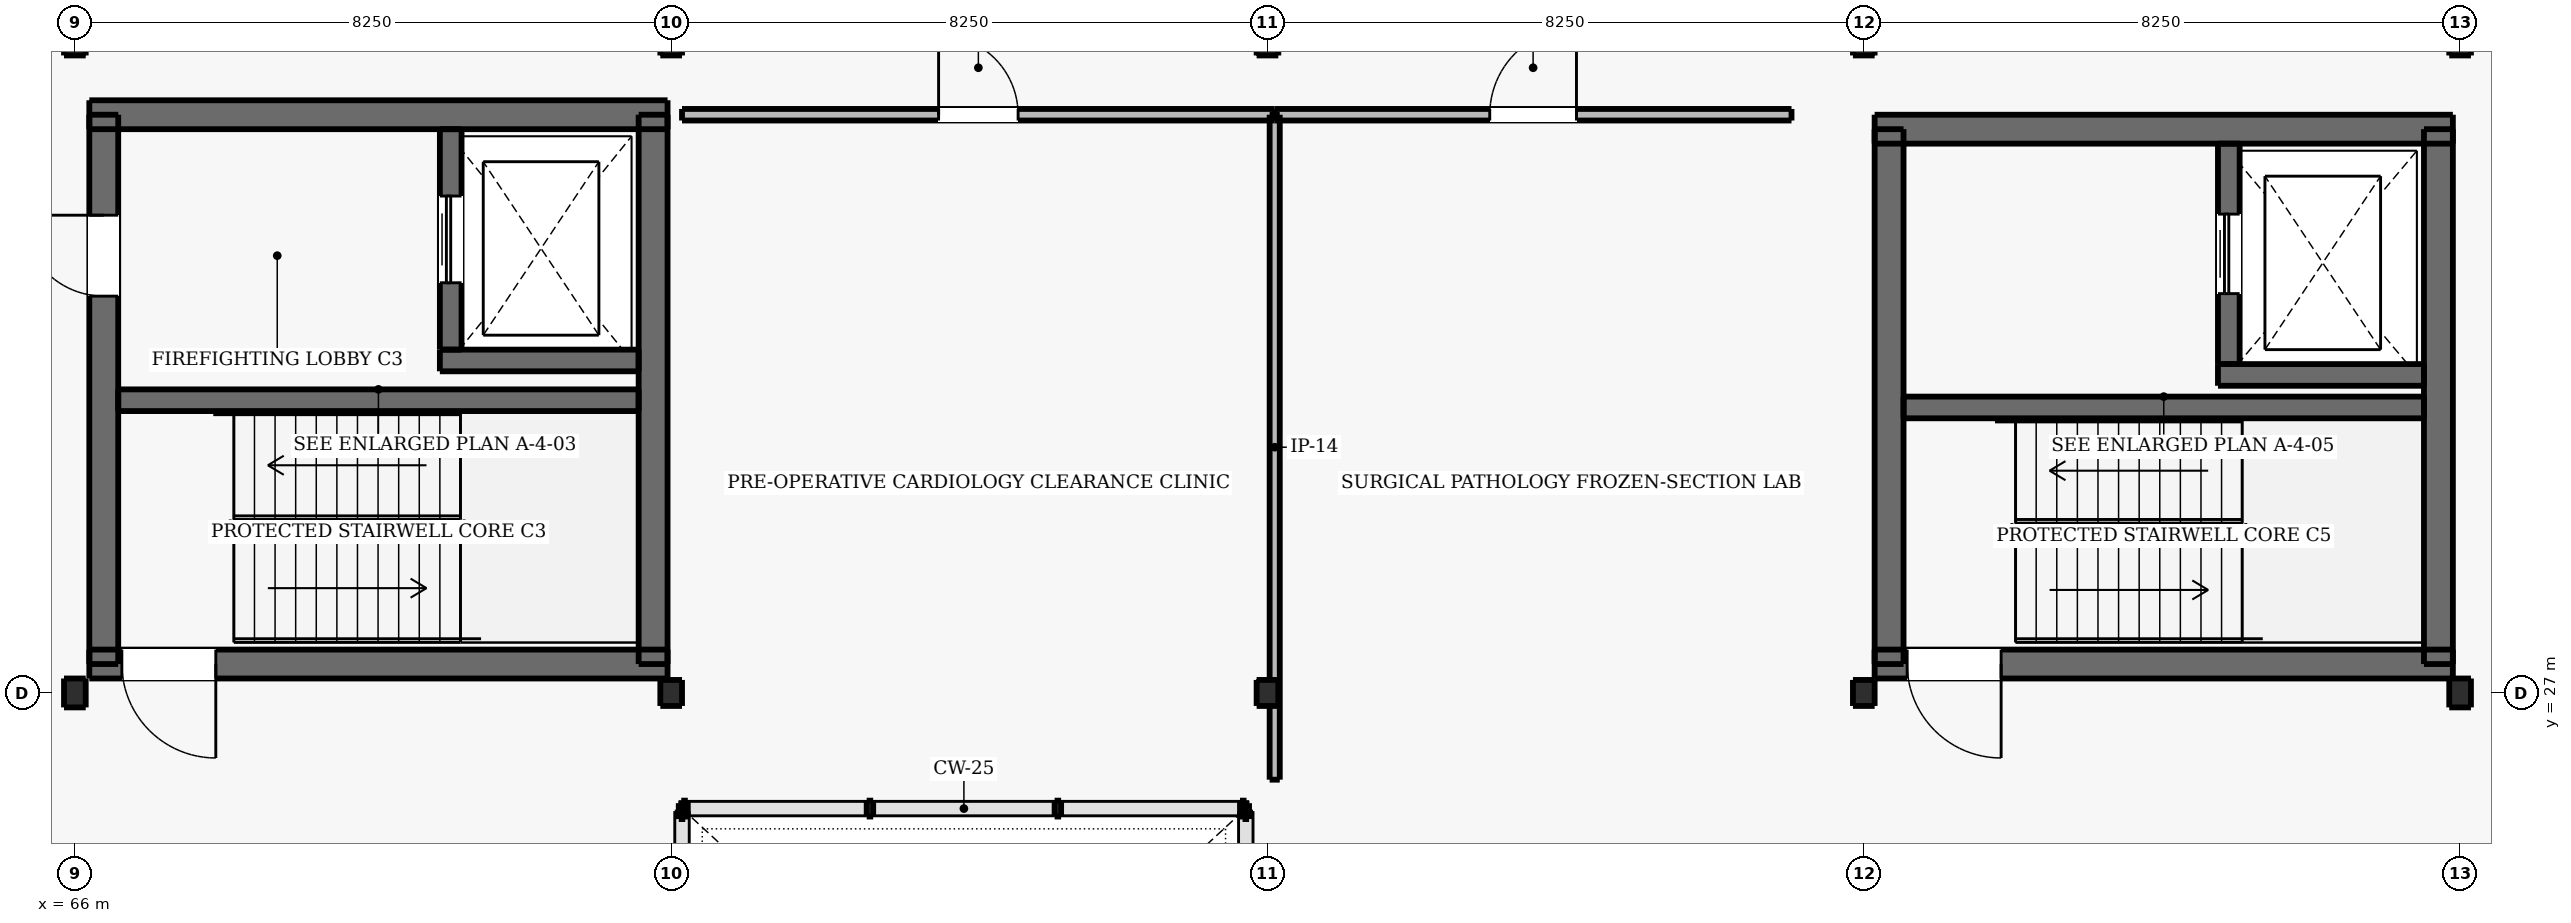
"""IFC4 building model, lengths in metres.
Left out: names, types, materials, properties, quantities, classifications, styles, units other than length and angle.
Written with IfcOpenShell. Run it as: python <this file> out.ifc"""

import sys

from ifc_helpers import new_model, si_unit, direction, frame, frame_2d, origin, origin_2d, place, context, subcontext, project, spatial, rectangle, i_section, extrude, element, fill, save


model = new_model("IFC4")
c1 = context("Model", 3, precision=1e-05, world=origin(), true_north=direction((0.0, 1.0)))
c2 = subcontext(c1, "Body", "Model", "MODEL_VIEW")
j1 = project(units=[si_unit("LENGTHUNIT", "METRE"), si_unit("PLANEANGLEUNIT", "RADIAN")], contexts=[c1])
p1 = place(None, origin())
s1 = spatial("IfcSite", under=j1, at=p1, CompositionType="ELEMENT")
p2 = place(p1, origin())
s2 = spatial("IfcBuilding", under=s1, at=p2, CompositionType="ELEMENT")
p3 = place(p2, frame((0.0, 0.0, 13.8)))
s3 = spatial("IfcBuildingStorey", under=s2, at=p3, CompositionType="ELEMENT", Elevation=13.8)
p4 = place(p3, frame((66.0, 27.0, 0.0), z_axis=(0.0, 0.0, 1.0), x_axis=(1.0, 0.0, 0.0)))
e1 = element("IfcColumn", 1, at=p4, inside=s3, PredefinedType="COLUMN", context=c2, shape_type="SweptSolid", body=[
    extrude(i_section(OverallWidth=0.3, OverallDepth=0.4, WebThickness=0.013, FlangeThickness=0.024, FilletRadius=0.027, at=origin_2d()), origin(), (0.0, 0.0, 1.0), 4.2),
])
for number, where, z_axis, x_axis in (
    (2, (66.0, 36.0, 0.0), (0.0, 0.0, 1.0), (1.0, 0.0, 0.0)),
    (3, (74.25, 27.0, 0.0), (0.0, 0.0, 1.0), (1.0, 0.0, 0.0)),
    (4, (74.25, 36.0, 0.0), (0.0, 0.0, 1.0), (1.0, 0.0, 0.0)),
    (5, (82.5, 27.0, 0.0), (0.0, 0.0, 1.0), (1.0, 0.0, 0.0)),
    (6, (82.5, 36.0, 0.0), (0.0, 0.0, 1.0), (1.0, 0.0, 0.0)),
    (7, (90.75, 27.0, 0.0), (0.0, 0.0, 1.0), (1.0, 0.0, 0.0)),
    (8, (90.75, 36.0, 0.0), (0.0, 0.0, 1.0), (1.0, 0.0, 0.0)),
):
    element("IfcColumn", number, at=place(p3, frame(where, z_axis=z_axis, x_axis=x_axis)), inside=s3, PredefinedType="COLUMN", context=c2, shape_type="SweptSolid", body=[
        extrude(i_section(OverallWidth=0.3, OverallDepth=0.36, WebThickness=0.012, FlangeThickness=0.022, FilletRadius=0.027, at=origin_2d()), origin(), (0.0, 0.0, 1.0), 4.2),
    ])
p5 = place(p3, frame((99.0, 27.0, 0.0), z_axis=(0.0, 0.0, 1.0), x_axis=(1.0, 0.0, 0.0)))
e9 = element("IfcColumn", 9, at=p5, inside=s3, PredefinedType="COLUMN", context=c2, shape_type="SweptSolid", body=[
    extrude(i_section(OverallWidth=0.3, OverallDepth=0.4, WebThickness=0.013, FlangeThickness=0.024, FilletRadius=0.027, at=origin_2d()), origin(), (0.0, 0.0, 1.0), 4.2),
])
p6 = place(p3, frame((99.0, 36.0, 0.0), z_axis=(0.0, 0.0, 1.0), x_axis=(1.0, 0.0, 0.0)))
e10 = element("IfcColumn", 10, at=p6, inside=s3, PredefinedType="COLUMN", context=c2, shape_type="SweptSolid", body=[
    extrude(i_section(OverallWidth=0.3, OverallDepth=0.36, WebThickness=0.012, FlangeThickness=0.022, FilletRadius=0.027, at=origin_2d()), origin(), (0.0, 0.0, 1.0), 4.2),
])
p7 = place(p3, frame((66.2, 27.4, 0.0), z_axis=(0.0, 0.0, 1.0), x_axis=(1.0, 0.0, 0.0)))
e11 = element("IfcWall", 11, at=p7, inside=s3, PredefinedType="SHEAR", context=c2, shape_type="SweptSolid", body=[
    extrude(rectangle(XDim=8.0, YDim=0.4, at=frame_2d((4.0, 0.0))), origin(), (0.0, 0.0, 1.0), 4.2),
])
p8 = place(p7, frame((0.45, 0.0, 0.0)))
e12 = element("IfcOpeningElement", 12, at=p8, cuts=e11, PredefinedType="OPENING", context=c2, shape_type="SweptSolid", body=[
    extrude(rectangle(XDim=1.3, YDim=2.15, at=frame_2d((0.65, 1.075))), frame((0.0, 0.21, 0.0), z_axis=(0.0, -1.0, 0.0), x_axis=(1.0, 0.0, 0.0)), (0.0, 0.0, 1.0), 0.42),
])
p9 = place(p3, frame((66.2, 35.0, 0.0), z_axis=(0.0, 0.0, 1.0), x_axis=(1.0, 0.0, 0.0)))
e13 = element("IfcWall", 13, at=p9, inside=s3, PredefinedType="SHEAR", context=c2, shape_type="SweptSolid", body=[
    extrude(rectangle(XDim=8.0, YDim=0.4, at=frame_2d((4.0, 0.0))), origin(), (0.0, 0.0, 1.0), 4.2),
])
p10 = place(p3, frame((66.4, 27.4, 0.0), z_axis=(0.0, 0.0, 1.0), x_axis=(0.0, 1.0, 0.0)))
e14 = element("IfcWall", 14, at=p10, inside=s3, PredefinedType="SHEAR", context=c2, shape_type="SweptSolid", body=[
    extrude(rectangle(XDim=7.6, YDim=0.4, at=frame_2d((3.8, 0.0))), origin(), (0.0, 0.0, 1.0), 4.2),
])
p11 = place(p10, frame((5.09, 0.0, 0.0)))
e15 = element("IfcOpeningElement", 15, at=p11, cuts=e14, PredefinedType="OPENING", context=c2, shape_type="SweptSolid", body=[
    extrude(rectangle(XDim=1.12, YDim=2.15, at=frame_2d((0.56, 1.075))), frame((0.0, 0.21, 0.0), z_axis=(0.0, -1.0, 0.0), x_axis=(1.0, 0.0, 0.0)), (0.0, 0.0, 1.0), 0.42),
])
p12 = place(p3, frame((74.0, 27.4, 0.0), z_axis=(0.0, 0.0, 1.0), x_axis=(0.0, 1.0, 0.0)))
e16 = element("IfcWall", 16, at=p12, inside=s3, PredefinedType="SHEAR", context=c2, shape_type="SweptSolid", body=[
    extrude(rectangle(XDim=7.6, YDim=0.4, at=frame_2d((3.8, 0.0))), origin(), (0.0, 0.0, 1.0), 4.2),
])
p13 = place(p3, frame((66.6, 31.05, 0.0), z_axis=(0.0, 0.0, 1.0), x_axis=(1.0, 0.0, 0.0)))
e17 = element("IfcWall", 17, at=p13, inside=s3, PredefinedType="SHEAR", context=c2, shape_type="SweptSolid", body=[
    extrude(rectangle(XDim=7.2, YDim=0.3, at=frame_2d((3.6, 0.0))), origin(), (0.0, 0.0, 1.0), 4.2),
])
p14 = place(p3, frame((71.05, 31.6, 0.0), z_axis=(0.0, 0.0, 1.0), x_axis=(1.0, 0.0, 0.0)))
e18 = element("IfcWall", 18, at=p14, inside=s3, PredefinedType="SHEAR", context=c2, shape_type="SweptSolid", body=[
    extrude(rectangle(XDim=2.75, YDim=0.3, at=frame_2d((1.375, 0.0))), origin(), (0.0, 0.0, 1.0), 4.2),
])
p15 = place(p3, frame((71.2, 31.75, 0.0), z_axis=(0.0, 0.0, 1.0), x_axis=(0.0, 1.0, 0.0)))
e19 = element("IfcWall", 19, at=p15, inside=s3, PredefinedType="SHEAR", context=c2, shape_type="SweptSolid", body=[
    extrude(rectangle(XDim=3.05, YDim=0.3, at=frame_2d((1.525, 0.0))), origin(), (0.0, 0.0, 1.0), 4.2),
])
p16 = place(p15, frame((0.925, 0.0, 0.0)))
e20 = element("IfcOpeningElement", 20, at=p16, cuts=e19, PredefinedType="OPENING", context=c2, shape_type="SweptSolid", body=[
    extrude(rectangle(XDim=1.2, YDim=2.15, at=frame_2d((0.6, 1.075))), frame((0.0, 0.16, 0.0), z_axis=(0.0, -1.0, 0.0), x_axis=(1.0, 0.0, 0.0)), (0.0, 0.0, 1.0), 0.32),
])
p17 = place(p3, frame((90.9, 27.4, 0.0), z_axis=(0.0, 0.0, 1.0), x_axis=(1.0, 0.0, 0.0)))
e21 = element("IfcWall", 21, at=p17, inside=s3, PredefinedType="SHEAR", context=c2, shape_type="SweptSolid", body=[
    extrude(rectangle(XDim=8.0, YDim=0.4, at=frame_2d((4.0, 0.0))), origin(), (0.0, 0.0, 1.0), 4.2),
])
p18 = place(p17, frame((0.45, 0.0, 0.0)))
e22 = element("IfcOpeningElement", 22, at=p18, cuts=e21, PredefinedType="OPENING", context=c2, shape_type="SweptSolid", body=[
    extrude(rectangle(XDim=1.3, YDim=2.15, at=frame_2d((0.65, 1.075))), frame((0.0, 0.21, 0.0), z_axis=(0.0, -1.0, 0.0), x_axis=(1.0, 0.0, 0.0)), (0.0, 0.0, 1.0), 0.42),
])
p19 = place(p3, frame((90.9, 34.8, 0.0), z_axis=(0.0, 0.0, 1.0), x_axis=(1.0, 0.0, 0.0)))
e23 = element("IfcWall", 23, at=p19, inside=s3, PredefinedType="SHEAR", context=c2, shape_type="SweptSolid", body=[
    extrude(rectangle(XDim=8.0, YDim=0.4, at=frame_2d((4.0, 0.0))), origin(), (0.0, 0.0, 1.0), 4.2),
])
for number, where, z_axis, x_axis in (
    (24, (91.1, 27.4, 0.0), (0.0, 0.0, 1.0), (0.0, 1.0, 0.0)),
    (25, (98.7, 27.4, 0.0), (0.0, 0.0, 1.0), (0.0, 1.0, 0.0)),
):
    element("IfcWall", number, at=place(p3, frame(where, z_axis=z_axis, x_axis=x_axis)), inside=s3, PredefinedType="SHEAR", context=c2, shape_type="SweptSolid", body=[
        extrude(rectangle(XDim=7.4, YDim=0.4, at=frame_2d((3.7, 0.0))), origin(), (0.0, 0.0, 1.0), 4.2),
    ])
p20 = place(p3, frame((91.3, 30.95, 0.0), z_axis=(0.0, 0.0, 1.0), x_axis=(1.0, 0.0, 0.0)))
e26 = element("IfcWall", 26, at=p20, inside=s3, PredefinedType="SHEAR", context=c2, shape_type="SweptSolid", body=[
    extrude(rectangle(XDim=7.2, YDim=0.3, at=frame_2d((3.6, 0.0))), origin(), (0.0, 0.0, 1.0), 4.2),
])
p21 = place(p3, frame((95.65, 31.4, 0.0), z_axis=(0.0, 0.0, 1.0), x_axis=(1.0, 0.0, 0.0)))
e27 = element("IfcWall", 27, at=p21, inside=s3, PredefinedType="SHEAR", context=c2, shape_type="SweptSolid", body=[
    extrude(rectangle(XDim=2.85, YDim=0.3, at=frame_2d((1.425, 0.0))), origin(), (0.0, 0.0, 1.0), 4.2),
])
p22 = place(p3, frame((95.8, 31.55, 0.0), z_axis=(0.0, 0.0, 1.0), x_axis=(0.0, 1.0, 0.0)))
e28 = element("IfcWall", 28, at=p22, inside=s3, PredefinedType="SHEAR", context=c2, shape_type="SweptSolid", body=[
    extrude(rectangle(XDim=3.05, YDim=0.3, at=frame_2d((1.525, 0.0))), origin(), (0.0, 0.0, 1.0), 4.2),
])
p23 = place(p22, frame((0.975, 0.0, 0.0)))
e29 = element("IfcOpeningElement", 29, at=p23, cuts=e28, PredefinedType="OPENING", context=c2, shape_type="SweptSolid", body=[
    extrude(rectangle(XDim=1.1, YDim=2.15, at=frame_2d((0.55, 1.075))), frame((0.0, 0.16, 0.0), z_axis=(0.0, -1.0, 0.0), x_axis=(1.0, 0.0, 0.0)), (0.0, 0.0, 1.0), 0.32),
])
p24 = place(p3, frame((74.4, 35.0, 0.0), z_axis=(0.0, 0.0, 1.0), x_axis=(1.0, 0.0, 0.0)))
e30 = element("IfcWall", 30, at=p24, inside=s3, PredefinedType="PARTITIONING", context=c2, shape_type="SweptSolid", body=[
    extrude(rectangle(XDim=8.2, YDim=0.16, at=frame_2d((4.1, 0.0))), origin(), (0.0, 0.0, 1.0), 3.94),
])
p25 = place(p24, frame((3.55, 0.0, 0.0)))
e31 = element("IfcOpeningElement", 31, at=p25, cuts=e30, PredefinedType="OPENING", context=c2, shape_type="SweptSolid", body=[
    extrude(rectangle(XDim=1.1, YDim=2.15, at=frame_2d((0.55, 1.075))), frame((0.0, 0.09, 0.0), z_axis=(0.0, -1.0, 0.0), x_axis=(1.0, 0.0, 0.0)), (0.0, 0.0, 1.0), 0.18),
])
p26 = place(p3, frame((82.6, 25.8, 0.0), z_axis=(0.0, 0.0, 1.0), x_axis=(0.0, 1.0, 0.0)))
e32 = element("IfcWall", 32, at=p26, inside=s3, PredefinedType="PARTITIONING", context=c2, shape_type="SweptSolid", body=[
    extrude(rectangle(XDim=9.2, YDim=0.14, at=frame_2d((4.6, 0.0))), origin(), (0.0, 0.0, 1.0), 3.54),
])
p27 = place(p3, frame((82.6, 35.0, 0.0), z_axis=(0.0, 0.0, 1.0), x_axis=(1.0, 0.0, 0.0)))
e33 = element("IfcWall", 33, at=p27, inside=s3, PredefinedType="PARTITIONING", context=c2, shape_type="SweptSolid", body=[
    extrude(rectangle(XDim=7.15, YDim=0.16, at=frame_2d((3.575, 0.0))), origin(), (0.0, 0.0, 1.0), 3.94),
])
p28 = place(p27, frame((2.975, 0.0, 0.0)))
e34 = element("IfcOpeningElement", 34, at=p28, cuts=e33, PredefinedType="OPENING", context=c2, shape_type="SweptSolid", body=[
    extrude(rectangle(XDim=1.2, YDim=2.2, at=frame_2d((0.6, 1.1))), frame((0.0, 0.09, 0.0), z_axis=(0.0, -1.0, 0.0), x_axis=(1.0, 0.0, 0.0)), (0.0, 0.0, 1.0), 0.18),
])
p29 = place(p16, origin())
e35 = element("IfcDoor", 35, at=p29, inside=s3, OperationType="DOUBLE_DOOR_SLIDING", PredefinedType="DOOR", context=c2, shape_type="SweptSolid", body=[
    extrude(rectangle(XDim=1.2, YDim=2.15, at=frame_2d((0.6, 1.075))), frame((0.0, 0.025, 0.0), z_axis=(0.0, -1.0, 0.0), x_axis=(1.0, 0.0, 0.0)), (0.0, 0.0, 1.0), 0.05),
])
fill(e20, e35)
p30 = place(p11, origin())
e36 = element("IfcDoor", 36, at=p30, inside=s3, OperationType="SINGLE_SWING_RIGHT", PredefinedType="DOOR", context=c2, shape_type="SweptSolid", body=[
    extrude(rectangle(XDim=1.12, YDim=2.15, at=frame_2d((0.56, 1.075))), frame((0.0, 0.025, 0.0), z_axis=(0.0, -1.0, 0.0), x_axis=(1.0, 0.0, 0.0)), (0.0, 0.0, 1.0), 0.05),
])
fill(e15, e36)
p31 = place(p8, frame((1.3, 0.0, 0.0), z_axis=(0.0, 0.0, 1.0), x_axis=(-1.0, 0.0, 0.0)))
e37 = element("IfcDoor", 37, at=p31, inside=s3, OperationType="SINGLE_SWING_RIGHT", PredefinedType="DOOR", context=c2, shape_type="SweptSolid", body=[
    extrude(rectangle(XDim=1.3, YDim=2.15, at=frame_2d((0.65, 1.075))), frame((0.0, 0.025, 0.0), z_axis=(0.0, -1.0, 0.0), x_axis=(1.0, 0.0, 0.0)), (0.0, 0.0, 1.0), 0.05),
])
fill(e12, e37)
p32 = place(p23, origin())
e38 = element("IfcDoor", 38, at=p32, inside=s3, OperationType="DOUBLE_DOOR_SLIDING", PredefinedType="DOOR", context=c2, shape_type="SweptSolid", body=[
    extrude(rectangle(XDim=1.1, YDim=2.15, at=frame_2d((0.55, 1.075))), frame((0.0, 0.025, 0.0), z_axis=(0.0, -1.0, 0.0), x_axis=(1.0, 0.0, 0.0)), (0.0, 0.0, 1.0), 0.05),
])
fill(e29, e38)
p33 = place(p18, frame((1.3, 0.0, 0.0), z_axis=(0.0, 0.0, 1.0), x_axis=(-1.0, 0.0, 0.0)))
e39 = element("IfcDoor", 39, at=p33, inside=s3, OperationType="SINGLE_SWING_RIGHT", PredefinedType="DOOR", context=c2, shape_type="SweptSolid", body=[
    extrude(rectangle(XDim=1.3, YDim=2.15, at=frame_2d((0.65, 1.075))), frame((0.0, 0.025, 0.0), z_axis=(0.0, -1.0, 0.0), x_axis=(1.0, 0.0, 0.0)), (0.0, 0.0, 1.0), 0.05),
])
fill(e22, e39)
p34 = place(p25, origin())
e40 = element("IfcDoor", 40, at=p34, inside=s3, OperationType="SINGLE_SWING_LEFT", PredefinedType="DOOR", context=c2, shape_type="SweptSolid", body=[
    extrude(rectangle(XDim=1.1, YDim=2.15, at=frame_2d((0.55, 1.075))), frame((0.0, 0.025, 0.0), z_axis=(0.0, -1.0, 0.0), x_axis=(1.0, 0.0, 0.0)), (0.0, 0.0, 1.0), 0.05),
])
fill(e31, e40)
p35 = place(p28, origin())
e41 = element("IfcDoor", 41, at=p35, inside=s3, OperationType="SINGLE_SWING_RIGHT", PredefinedType="DOOR", context=c2, shape_type="SweptSolid", body=[
    extrude(rectangle(XDim=1.2, YDim=2.2, at=frame_2d((0.6, 1.1))), frame((0.0, 0.025, 0.0), z_axis=(0.0, -1.0, 0.0), x_axis=(1.0, 0.0, 0.0)), (0.0, 0.0, 1.0), 0.05),
])
fill(e34, e41)
save(model, sys.argv[1])
